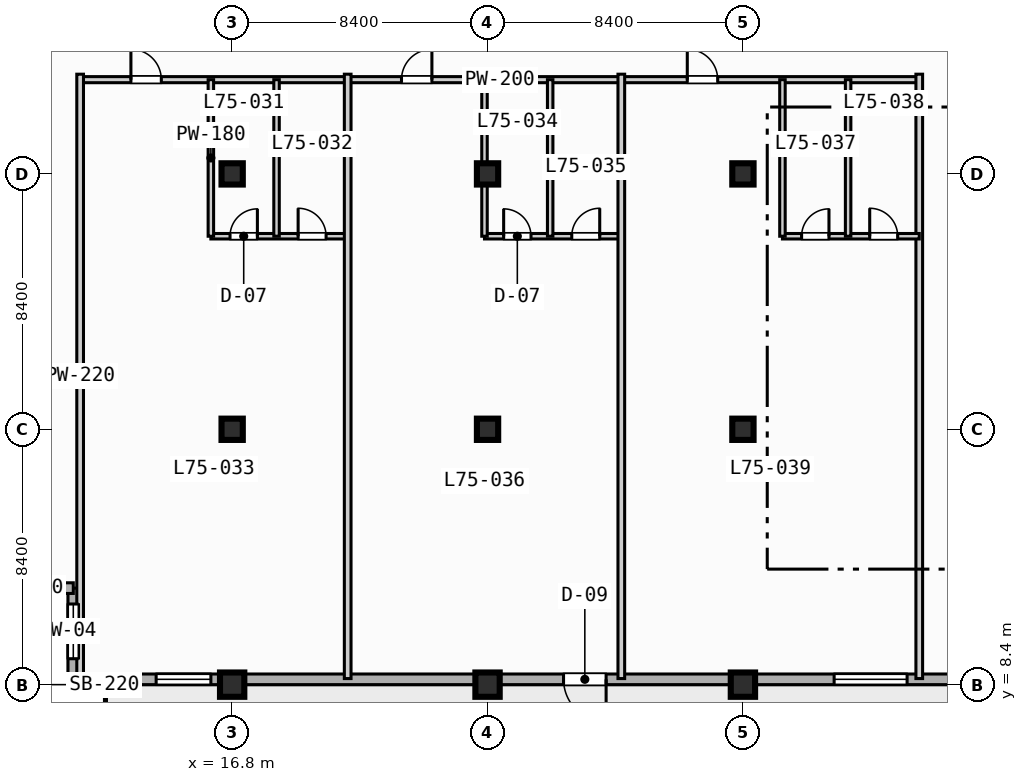
"""IFC4 building model, lengths in metres.
Left out: names, types, materials, properties, quantities, classifications, styles, units other than length and angle.
Written with IfcOpenShell. Run it as: python <this file> out.ifc"""

import sys

from ifc_helpers import new_model, si_unit, direction, frame, frame_2d, origin, origin_2d, place, context, subcontext, project, spatial, rectangle, extrude, element, fill, save


model = new_model("IFC4")
c1 = context("Model", 3, precision=1e-05, world=origin(), true_north=direction((0.0, 1.0)))
c2 = subcontext(c1, "Body", "Model", "MODEL_VIEW")
j1 = project(units=[si_unit("LENGTHUNIT", "METRE"), si_unit("PLANEANGLEUNIT", "RADIAN")], contexts=[c1])
p1 = place(None, origin())
s1 = spatial("IfcSite", under=j1, at=p1, CompositionType="ELEMENT")
p2 = place(p1, origin())
s2 = spatial("IfcBuilding", under=s1, at=p2, CompositionType="ELEMENT")
p3 = place(p2, frame((0.0, 0.0, 304.7)))
s3 = spatial("IfcBuildingStorey", under=s2, at=p3, CompositionType="ELEMENT", Elevation=304.7)
p4 = place(p3, frame((16.8, 8.4, 0.0), z_axis=(0.0, 0.0, 1.0), x_axis=(1.0, 0.0, 0.0)))
e1 = element("IfcColumn", 1, at=p4, inside=s3, PredefinedType="COLUMN", context=c2, shape_type="SweptSolid", body=[
    extrude(rectangle(XDim=0.8, YDim=0.8, at=origin_2d()), origin(), (0.0, 0.0, 1.0), 3.9),
])
for number, where, z_axis, x_axis in (
    (2, (16.8, 16.8, 0.0), (0.0, 0.0, 1.0), (1.0, 0.0, 0.0)),
    (3, (16.8, 25.2, 0.0), (0.0, 0.0, 1.0), (1.0, 0.0, 0.0)),
):
    element("IfcColumn", number, at=place(p3, frame(where, z_axis=z_axis, x_axis=x_axis)), inside=s3, PredefinedType="COLUMN", context=c2, shape_type="SweptSolid", body=[
        extrude(rectangle(XDim=0.7, YDim=0.7, at=origin_2d()), origin(), (0.0, 0.0, 1.0), 3.9),
    ])
p5 = place(p3, frame((25.2, 8.4, 0.0), z_axis=(0.0, 0.0, 1.0), x_axis=(1.0, 0.0, 0.0)))
e4 = element("IfcColumn", 4, at=p5, inside=s3, PredefinedType="COLUMN", context=c2, shape_type="SweptSolid", body=[
    extrude(rectangle(XDim=0.8, YDim=0.8, at=origin_2d()), origin(), (0.0, 0.0, 1.0), 3.9),
])
for number, where, z_axis, x_axis in (
    (5, (25.2, 16.8, 0.0), (0.0, 0.0, 1.0), (1.0, 0.0, 0.0)),
    (6, (25.2, 25.2, 0.0), (0.0, 0.0, 1.0), (1.0, 0.0, 0.0)),
):
    element("IfcColumn", number, at=place(p3, frame(where, z_axis=z_axis, x_axis=x_axis)), inside=s3, PredefinedType="COLUMN", context=c2, shape_type="SweptSolid", body=[
        extrude(rectangle(XDim=0.7, YDim=0.7, at=origin_2d()), origin(), (0.0, 0.0, 1.0), 3.9),
    ])
p6 = place(p3, frame((33.6, 8.4, 0.0), z_axis=(0.0, 0.0, 1.0), x_axis=(1.0, 0.0, 0.0)))
e7 = element("IfcColumn", 7, at=p6, inside=s3, PredefinedType="COLUMN", context=c2, shape_type="SweptSolid", body=[
    extrude(rectangle(XDim=0.8, YDim=0.8, at=origin_2d()), origin(), (0.0, 0.0, 1.0), 3.9),
])
for number, where, z_axis, x_axis in (
    (8, (33.6, 16.8, 0.0), (0.0, 0.0, 1.0), (1.0, 0.0, 0.0)),
    (9, (33.6, 25.2, 0.0), (0.0, 0.0, 1.0), (1.0, 0.0, 0.0)),
):
    element("IfcColumn", number, at=place(p3, frame(where, z_axis=z_axis, x_axis=x_axis)), inside=s3, PredefinedType="COLUMN", context=c2, shape_type="SweptSolid", body=[
        extrude(rectangle(XDim=0.7, YDim=0.7, at=origin_2d()), origin(), (0.0, 0.0, 1.0), 3.9),
    ])
p7 = place(p3, frame((11.575, 8.575, 0.0), z_axis=(0.0, 0.0, 1.0), x_axis=(0.0, 1.0, 0.0)))
e10 = element("IfcWall", 10, at=p7, inside=s3, PredefinedType="STANDARD", context=c2, shape_type="SweptSolid", body=[
    extrude(rectangle(XDim=3.0, YDim=0.35, at=frame_2d((1.5, 0.0))), origin(), (0.0, 0.0, 1.0), 3.67),
])
p8 = place(p7, frame((0.677, 0.0, 0.85)))
e11 = element("IfcOpeningElement", 11, at=p8, cuts=e10, PredefinedType="OPENING", context=c2, shape_type="SweptSolid", body=[
    extrude(rectangle(XDim=1.8, YDim=1.8, at=frame_2d((0.9, 0.9))), frame((0.0, 0.185, 0.0), z_axis=(0.0, -1.0, 0.0), x_axis=(1.0, 0.0, 0.0)), (0.0, 0.0, 1.0), 0.37),
])
p9 = place(p3, frame((11.575, 11.575, 0.0), z_axis=(0.0, 0.0, 1.0), x_axis=(-1.0, 0.0, 0.0)))
e12 = element("IfcWall", 12, at=p9, inside=s3, PredefinedType="STANDARD", context=c2, shape_type="SweptSolid", body=[
    extrude(rectangle(XDim=3.0, YDim=0.35, at=frame_2d((1.5, 0.0))), origin(), (0.0, 0.0, 1.0), 3.67),
])
p10 = place(p3, frame((64.025, 8.575, 0.0), z_axis=(0.0, 0.0, 1.0), x_axis=(-1.0, 0.0, 0.0)))
e13 = element("IfcWall", 13, at=p10, inside=s3, PredefinedType="STANDARD", context=c2, shape_type="SweptSolid", body=[
    extrude(rectangle(XDim=52.45, YDim=0.35, at=frame_2d((26.225, 0.0))), origin(), (0.0, 0.0, 1.0), 3.67),
])
p11 = place(p10, frame((34.925, 0.0, 0.0)))
e14 = element("IfcOpeningElement", 14, at=p11, cuts=e13, PredefinedType="OPENING", context=c2, shape_type="SweptSolid", body=[
    extrude(rectangle(XDim=1.4, YDim=2.2, at=frame_2d((0.7, 1.1))), frame((0.0, 0.185, 0.0), z_axis=(0.0, -1.0, 0.0), x_axis=(1.0, 0.0, 0.0)), (0.0, 0.0, 1.0), 0.37),
])
p12 = place(p10, frame((25.025, 0.0, 0.85)))
e15 = element("IfcOpeningElement", 15, at=p12, cuts=e13, PredefinedType="OPENING", context=c2, shape_type="SweptSolid", body=[
    extrude(rectangle(XDim=2.4, YDim=1.95, at=frame_2d((1.2, 0.975))), frame((0.0, 0.185, 0.0), z_axis=(0.0, -1.0, 0.0), x_axis=(1.0, 0.0, 0.0)), (0.0, 0.0, 1.0), 0.37),
])
p13 = place(p10, frame((16.925, 0.0, 0.85)))
e16 = element("IfcOpeningElement", 16, at=p13, cuts=e13, PredefinedType="OPENING", context=c2, shape_type="SweptSolid", body=[
    extrude(rectangle(XDim=1.8, YDim=1.8, at=frame_2d((0.9, 0.9))), frame((0.0, 0.185, 0.0), z_axis=(0.0, -1.0, 0.0), x_axis=(1.0, 0.0, 0.0)), (0.0, 0.0, 1.0), 0.37),
])
p14 = place(p10, frame((47.925, 0.0, 0.85)))
e17 = element("IfcOpeningElement", 17, at=p14, cuts=e13, PredefinedType="OPENING", context=c2, shape_type="SweptSolid", body=[
    extrude(rectangle(XDim=1.8, YDim=1.8, at=frame_2d((0.9, 0.9))), frame((0.0, 0.185, 0.0), z_axis=(0.0, -1.0, 0.0), x_axis=(1.0, 0.0, 0.0)), (0.0, 0.0, 1.0), 0.37),
])
p15 = place(p3, frame((11.8, 28.3, 0.0), z_axis=(0.0, 0.0, 1.0), x_axis=(1.0, 0.0, 0.0)))
e18 = element("IfcWall", 18, at=p15, inside=s3, PredefinedType="PARTITIONING", context=c2, shape_type="SweptSolid", body=[
    extrude(rectangle(XDim=27.6, YDim=0.2, at=frame_2d((13.8, 0.0))), origin(), (0.0, 0.0, 1.0), 3.67),
])
p16 = place(p15, frame((1.67, 0.0, 0.0)))
e19 = element("IfcOpeningElement", 19, at=p16, cuts=e18, PredefinedType="OPENING", context=c2, shape_type="SweptSolid", body=[
    extrude(rectangle(XDim=1.0, YDim=2.15, at=frame_2d((0.5, 1.075))), frame((0.0, 0.11, 0.0), z_axis=(0.0, -1.0, 0.0), x_axis=(1.0, 0.0, 0.0)), (0.0, 0.0, 1.0), 0.22),
])
p17 = place(p15, frame((10.57, 0.0, 0.0)))
e20 = element("IfcOpeningElement", 20, at=p17, cuts=e18, PredefinedType="OPENING", context=c2, shape_type="SweptSolid", body=[
    extrude(rectangle(XDim=1.0, YDim=2.15, at=frame_2d((0.5, 1.075))), frame((0.0, 0.11, 0.0), z_axis=(0.0, -1.0, 0.0), x_axis=(1.0, 0.0, 0.0)), (0.0, 0.0, 1.0), 0.22),
])
p18 = place(p15, frame((19.97, 0.0, 0.0)))
e21 = element("IfcOpeningElement", 21, at=p18, cuts=e18, PredefinedType="OPENING", context=c2, shape_type="SweptSolid", body=[
    extrude(rectangle(XDim=1.0, YDim=2.15, at=frame_2d((0.5, 1.075))), frame((0.0, 0.11, 0.0), z_axis=(0.0, -1.0, 0.0), x_axis=(1.0, 0.0, 0.0)), (0.0, 0.0, 1.0), 0.22),
])
p19 = place(p3, frame((11.8, 8.6, 0.0), z_axis=(0.0, 0.0, 1.0), x_axis=(0.0, 1.0, 0.0)))
e22 = element("IfcWall", 22, at=p19, inside=s3, PredefinedType="PARTITIONING", context=c2, shape_type="SweptSolid", body=[
    extrude(rectangle(XDim=19.88, YDim=0.22, at=frame_2d((9.94, 0.0))), origin(), (0.0, 0.0, 1.0), 3.67),
])
p20 = place(p3, frame((16.1, 23.15, 0.0), z_axis=(0.0, 0.0, 1.0), x_axis=(1.0, 0.0, 0.0)))
e23 = element("IfcWall", 23, at=p20, inside=s3, PredefinedType="PLUMBINGWALL", context=c2, shape_type="SweptSolid", body=[
    extrude(rectangle(XDim=4.5, YDim=0.18, at=frame_2d((2.25, 0.0))), origin(), (0.0, 0.0, 1.0), 3.67),
])
p21 = place(p20, frame((0.63, 0.0, 0.0)))
e24 = element("IfcOpeningElement", 24, at=p21, cuts=e23, PredefinedType="OPENING", context=c2, shape_type="SweptSolid", body=[
    extrude(rectangle(XDim=0.9, YDim=2.1, at=frame_2d((0.45, 1.05))), frame((0.0, 0.1, 0.0), z_axis=(0.0, -1.0, 0.0), x_axis=(1.0, 0.0, 0.0)), (0.0, 0.0, 1.0), 0.2),
])
p22 = place(p20, frame((2.87, 0.0, 0.0)))
e25 = element("IfcOpeningElement", 25, at=p22, cuts=e23, PredefinedType="OPENING", context=c2, shape_type="SweptSolid", body=[
    extrude(rectangle(XDim=0.92, YDim=2.1, at=frame_2d((0.46, 1.05))), frame((0.0, 0.1, 0.0), z_axis=(0.0, -1.0, 0.0), x_axis=(1.0, 0.0, 0.0)), (0.0, 0.0, 1.0), 0.2),
])
for number, where, z_axis, x_axis in (
    (26, (16.1, 23.15, 0.0), (0.0, 0.0, 1.0), (0.0, 1.0, 0.0)),
    (27, (18.26, 23.15, 0.0), (0.0, 0.0, 1.0), (0.0, 1.0, 0.0)),
):
    element("IfcWall", number, at=place(p3, frame(where, z_axis=z_axis, x_axis=x_axis)), inside=s3, PredefinedType="PLUMBINGWALL", context=c2, shape_type="SweptSolid", body=[
        extrude(rectangle(XDim=5.15, YDim=0.18, at=frame_2d((2.575, 0.0))), origin(), (0.0, 0.0, 1.0), 3.67),
    ])
p23 = place(p3, frame((20.6, 8.6, 0.0), z_axis=(0.0, 0.0, 1.0), x_axis=(0.0, 1.0, 0.0)))
e28 = element("IfcWall", 28, at=p23, inside=s3, PredefinedType="PARTITIONING", context=c2, shape_type="SweptSolid", body=[
    extrude(rectangle(XDim=19.88, YDim=0.22, at=frame_2d((9.94, 0.0))), origin(), (0.0, 0.0, 1.0), 3.67),
])
p24 = place(p3, frame((25.1, 23.15, 0.0), z_axis=(0.0, 0.0, 1.0), x_axis=(1.0, 0.0, 0.0)))
e29 = element("IfcWall", 29, at=p24, inside=s3, PredefinedType="PLUMBINGWALL", context=c2, shape_type="SweptSolid", body=[
    extrude(rectangle(XDim=4.5, YDim=0.18, at=frame_2d((2.25, 0.0))), origin(), (0.0, 0.0, 1.0), 3.67),
])
p25 = place(p24, frame((0.63, 0.0, 0.0)))
e30 = element("IfcOpeningElement", 30, at=p25, cuts=e29, PredefinedType="OPENING", context=c2, shape_type="SweptSolid", body=[
    extrude(rectangle(XDim=0.9, YDim=2.1, at=frame_2d((0.45, 1.05))), frame((0.0, 0.1, 0.0), z_axis=(0.0, -1.0, 0.0), x_axis=(1.0, 0.0, 0.0)), (0.0, 0.0, 1.0), 0.2),
])
p26 = place(p24, frame((2.87, 0.0, 0.0)))
e31 = element("IfcOpeningElement", 31, at=p26, cuts=e29, PredefinedType="OPENING", context=c2, shape_type="SweptSolid", body=[
    extrude(rectangle(XDim=0.92, YDim=2.1, at=frame_2d((0.46, 1.05))), frame((0.0, 0.1, 0.0), z_axis=(0.0, -1.0, 0.0), x_axis=(1.0, 0.0, 0.0)), (0.0, 0.0, 1.0), 0.2),
])
p27 = place(p3, frame((25.1, 23.15, 0.0), z_axis=(0.0, 0.0, 1.0), x_axis=(0.0, 1.0, 0.0)))
e32 = element("IfcWall", 32, at=p27, inside=s3, PredefinedType="PLUMBINGWALL", context=c2, shape_type="SweptSolid", body=[
    extrude(rectangle(XDim=5.15, YDim=0.18, at=frame_2d((2.575, 0.0))), origin(), (0.0, 0.0, 1.0), 3.07),
])
p28 = place(p3, frame((27.26, 23.15, 0.0), z_axis=(0.0, 0.0, 1.0), x_axis=(0.0, 1.0, 0.0)))
e33 = element("IfcWall", 33, at=p28, inside=s3, PredefinedType="PLUMBINGWALL", context=c2, shape_type="SweptSolid", body=[
    extrude(rectangle(XDim=5.15, YDim=0.18, at=frame_2d((2.575, 0.0))), origin(), (0.0, 0.0, 1.0), 3.67),
])
for number, where, z_axis, x_axis in (
    (34, (29.6, 8.6, 0.0), (0.0, 0.0, 1.0), (0.0, 1.0, 0.0)),
    (35, (39.4, 8.6, 0.0), (0.0, 0.0, 1.0), (0.0, 1.0, 0.0)),
):
    element("IfcWall", number, at=place(p3, frame(where, z_axis=z_axis, x_axis=x_axis)), inside=s3, PredefinedType="PARTITIONING", context=c2, shape_type="SweptSolid", body=[
        extrude(rectangle(XDim=19.88, YDim=0.22, at=frame_2d((9.94, 0.0))), origin(), (0.0, 0.0, 1.0), 3.67),
    ])
p29 = place(p3, frame((34.9, 23.15, 0.0), z_axis=(0.0, 0.0, 1.0), x_axis=(1.0, 0.0, 0.0)))
e36 = element("IfcWall", 36, at=p29, inside=s3, PredefinedType="PLUMBINGWALL", context=c2, shape_type="SweptSolid", body=[
    extrude(rectangle(XDim=4.5, YDim=0.18, at=frame_2d((2.25, 0.0))), origin(), (0.0, 0.0, 1.0), 3.67),
])
p30 = place(p29, frame((0.63, 0.0, 0.0)))
e37 = element("IfcOpeningElement", 37, at=p30, cuts=e36, PredefinedType="OPENING", context=c2, shape_type="SweptSolid", body=[
    extrude(rectangle(XDim=0.9, YDim=2.1, at=frame_2d((0.45, 1.05))), frame((0.0, 0.1, 0.0), z_axis=(0.0, -1.0, 0.0), x_axis=(1.0, 0.0, 0.0)), (0.0, 0.0, 1.0), 0.2),
])
p31 = place(p29, frame((2.87, 0.0, 0.0)))
e38 = element("IfcOpeningElement", 38, at=p31, cuts=e36, PredefinedType="OPENING", context=c2, shape_type="SweptSolid", body=[
    extrude(rectangle(XDim=0.92, YDim=2.1, at=frame_2d((0.46, 1.05))), frame((0.0, 0.1, 0.0), z_axis=(0.0, -1.0, 0.0), x_axis=(1.0, 0.0, 0.0)), (0.0, 0.0, 1.0), 0.2),
])
for number, where, z_axis, x_axis in (
    (39, (34.9, 23.15, 0.0), (0.0, 0.0, 1.0), (0.0, 1.0, 0.0)),
    (40, (37.06, 23.15, 0.0), (0.0, 0.0, 1.0), (0.0, 1.0, 0.0)),
):
    element("IfcWall", number, at=place(p3, frame(where, z_axis=z_axis, x_axis=x_axis)), inside=s3, PredefinedType="PLUMBINGWALL", context=c2, shape_type="SweptSolid", body=[
        extrude(rectangle(XDim=5.15, YDim=0.18, at=frame_2d((2.575, 0.0))), origin(), (0.0, 0.0, 1.0), 3.67),
    ])
p32 = place(p8, origin())
e41 = element("IfcWindow", 41, at=p32, inside=s3, PartitioningType="SINGLE_PANEL", PredefinedType="WINDOW", context=c2, shape_type="SweptSolid", body=[
    extrude(rectangle(XDim=1.8, YDim=1.8, at=frame_2d((0.9, 0.9))), frame((0.0, 0.03, 0.0), z_axis=(0.0, -1.0, 0.0), x_axis=(1.0, 0.0, 0.0)), (0.0, 0.0, 1.0), 0.06),
])
fill(e11, e41)
p33 = place(p11, origin())
e42 = element("IfcDoor", 42, at=p33, inside=s3, OperationType="SINGLE_SWING_LEFT", PredefinedType="DOOR", context=c2, shape_type="SweptSolid", body=[
    extrude(rectangle(XDim=1.4, YDim=2.2, at=frame_2d((0.7, 1.1))), frame((0.0, 0.025, 0.0), z_axis=(0.0, -1.0, 0.0), x_axis=(1.0, 0.0, 0.0)), (0.0, 0.0, 1.0), 0.05),
])
fill(e14, e42)
p34 = place(p12, origin())
e43 = element("IfcWindow", 43, at=p34, inside=s3, PartitioningType="SINGLE_PANEL", PredefinedType="WINDOW", context=c2, shape_type="SweptSolid", body=[
    extrude(rectangle(XDim=2.4, YDim=1.95, at=frame_2d((1.2, 0.975))), frame((0.0, 0.03, 0.0), z_axis=(0.0, -1.0, 0.0), x_axis=(1.0, 0.0, 0.0)), (0.0, 0.0, 1.0), 0.06),
])
fill(e15, e43)
p35 = place(p14, origin())
e44 = element("IfcWindow", 44, at=p35, inside=s3, PartitioningType="SINGLE_PANEL", PredefinedType="WINDOW", context=c2, shape_type="SweptSolid", body=[
    extrude(rectangle(XDim=1.8, YDim=1.8, at=frame_2d((0.9, 0.9))), frame((0.0, 0.03, 0.0), z_axis=(0.0, -1.0, 0.0), x_axis=(1.0, 0.0, 0.0)), (0.0, 0.0, 1.0), 0.06),
])
fill(e17, e44)
p36 = place(p16, origin())
e45 = element("IfcDoor", 45, at=p36, inside=s3, OperationType="SINGLE_SWING_LEFT", PredefinedType="DOOR", context=c2, shape_type="SweptSolid", body=[
    extrude(rectangle(XDim=1.0, YDim=2.15, at=frame_2d((0.5, 1.075))), frame((0.0, 0.025, 0.0), z_axis=(0.0, -1.0, 0.0), x_axis=(1.0, 0.0, 0.0)), (0.0, 0.0, 1.0), 0.05),
])
fill(e19, e45)
p37 = place(p17, origin())
e46 = element("IfcDoor", 46, at=p37, inside=s3, OperationType="SINGLE_SWING_RIGHT", PredefinedType="DOOR", context=c2, shape_type="SweptSolid", body=[
    extrude(rectangle(XDim=1.0, YDim=2.15, at=frame_2d((0.5, 1.075))), frame((0.0, 0.025, 0.0), z_axis=(0.0, -1.0, 0.0), x_axis=(1.0, 0.0, 0.0)), (0.0, 0.0, 1.0), 0.05),
])
fill(e20, e46)
p38 = place(p18, origin())
e47 = element("IfcDoor", 47, at=p38, inside=s3, OperationType="SINGLE_SWING_LEFT", PredefinedType="DOOR", context=c2, shape_type="SweptSolid", body=[
    extrude(rectangle(XDim=1.0, YDim=2.15, at=frame_2d((0.5, 1.075))), frame((0.0, 0.025, 0.0), z_axis=(0.0, -1.0, 0.0), x_axis=(1.0, 0.0, 0.0)), (0.0, 0.0, 1.0), 0.05),
])
fill(e21, e47)
p39 = place(p21, origin())
e48 = element("IfcDoor", 48, at=p39, inside=s3, OperationType="SINGLE_SWING_RIGHT", PredefinedType="DOOR", context=c2, shape_type="SweptSolid", body=[
    extrude(rectangle(XDim=0.9, YDim=2.1, at=frame_2d((0.45, 1.05))), frame((0.0, 0.025, 0.0), z_axis=(0.0, -1.0, 0.0), x_axis=(1.0, 0.0, 0.0)), (0.0, 0.0, 1.0), 0.05),
])
fill(e24, e48)
p40 = place(p22, origin())
e49 = element("IfcDoor", 49, at=p40, inside=s3, OperationType="SINGLE_SWING_LEFT", PredefinedType="DOOR", context=c2, shape_type="SweptSolid", body=[
    extrude(rectangle(XDim=0.92, YDim=2.1, at=frame_2d((0.46, 1.05))), frame((0.0, 0.025, 0.0), z_axis=(0.0, -1.0, 0.0), x_axis=(1.0, 0.0, 0.0)), (0.0, 0.0, 1.0), 0.05),
])
fill(e25, e49)
p41 = place(p25, origin())
e50 = element("IfcDoor", 50, at=p41, inside=s3, OperationType="SINGLE_SWING_LEFT", PredefinedType="DOOR", context=c2, shape_type="SweptSolid", body=[
    extrude(rectangle(XDim=0.9, YDim=2.1, at=frame_2d((0.45, 1.05))), frame((0.0, 0.025, 0.0), z_axis=(0.0, -1.0, 0.0), x_axis=(1.0, 0.0, 0.0)), (0.0, 0.0, 1.0), 0.05),
])
fill(e30, e50)
p42 = place(p26, origin())
e51 = element("IfcDoor", 51, at=p42, inside=s3, OperationType="SINGLE_SWING_RIGHT", PredefinedType="DOOR", context=c2, shape_type="SweptSolid", body=[
    extrude(rectangle(XDim=0.92, YDim=2.1, at=frame_2d((0.46, 1.05))), frame((0.0, 0.025, 0.0), z_axis=(0.0, -1.0, 0.0), x_axis=(1.0, 0.0, 0.0)), (0.0, 0.0, 1.0), 0.05),
])
fill(e31, e51)
p43 = place(p30, origin())
e52 = element("IfcDoor", 52, at=p43, inside=s3, OperationType="SINGLE_SWING_RIGHT", PredefinedType="DOOR", context=c2, shape_type="SweptSolid", body=[
    extrude(rectangle(XDim=0.9, YDim=2.1, at=frame_2d((0.45, 1.05))), frame((0.0, 0.025, 0.0), z_axis=(0.0, -1.0, 0.0), x_axis=(1.0, 0.0, 0.0)), (0.0, 0.0, 1.0), 0.05),
])
fill(e37, e52)
p44 = place(p31, origin())
e53 = element("IfcDoor", 53, at=p44, inside=s3, OperationType="SINGLE_SWING_LEFT", PredefinedType="DOOR", context=c2, shape_type="SweptSolid", body=[
    extrude(rectangle(XDim=0.92, YDim=2.1, at=frame_2d((0.46, 1.05))), frame((0.0, 0.025, 0.0), z_axis=(0.0, -1.0, 0.0), x_axis=(1.0, 0.0, 0.0)), (0.0, 0.0, 1.0), 0.05),
])
fill(e38, e53)
save(model, sys.argv[1])
